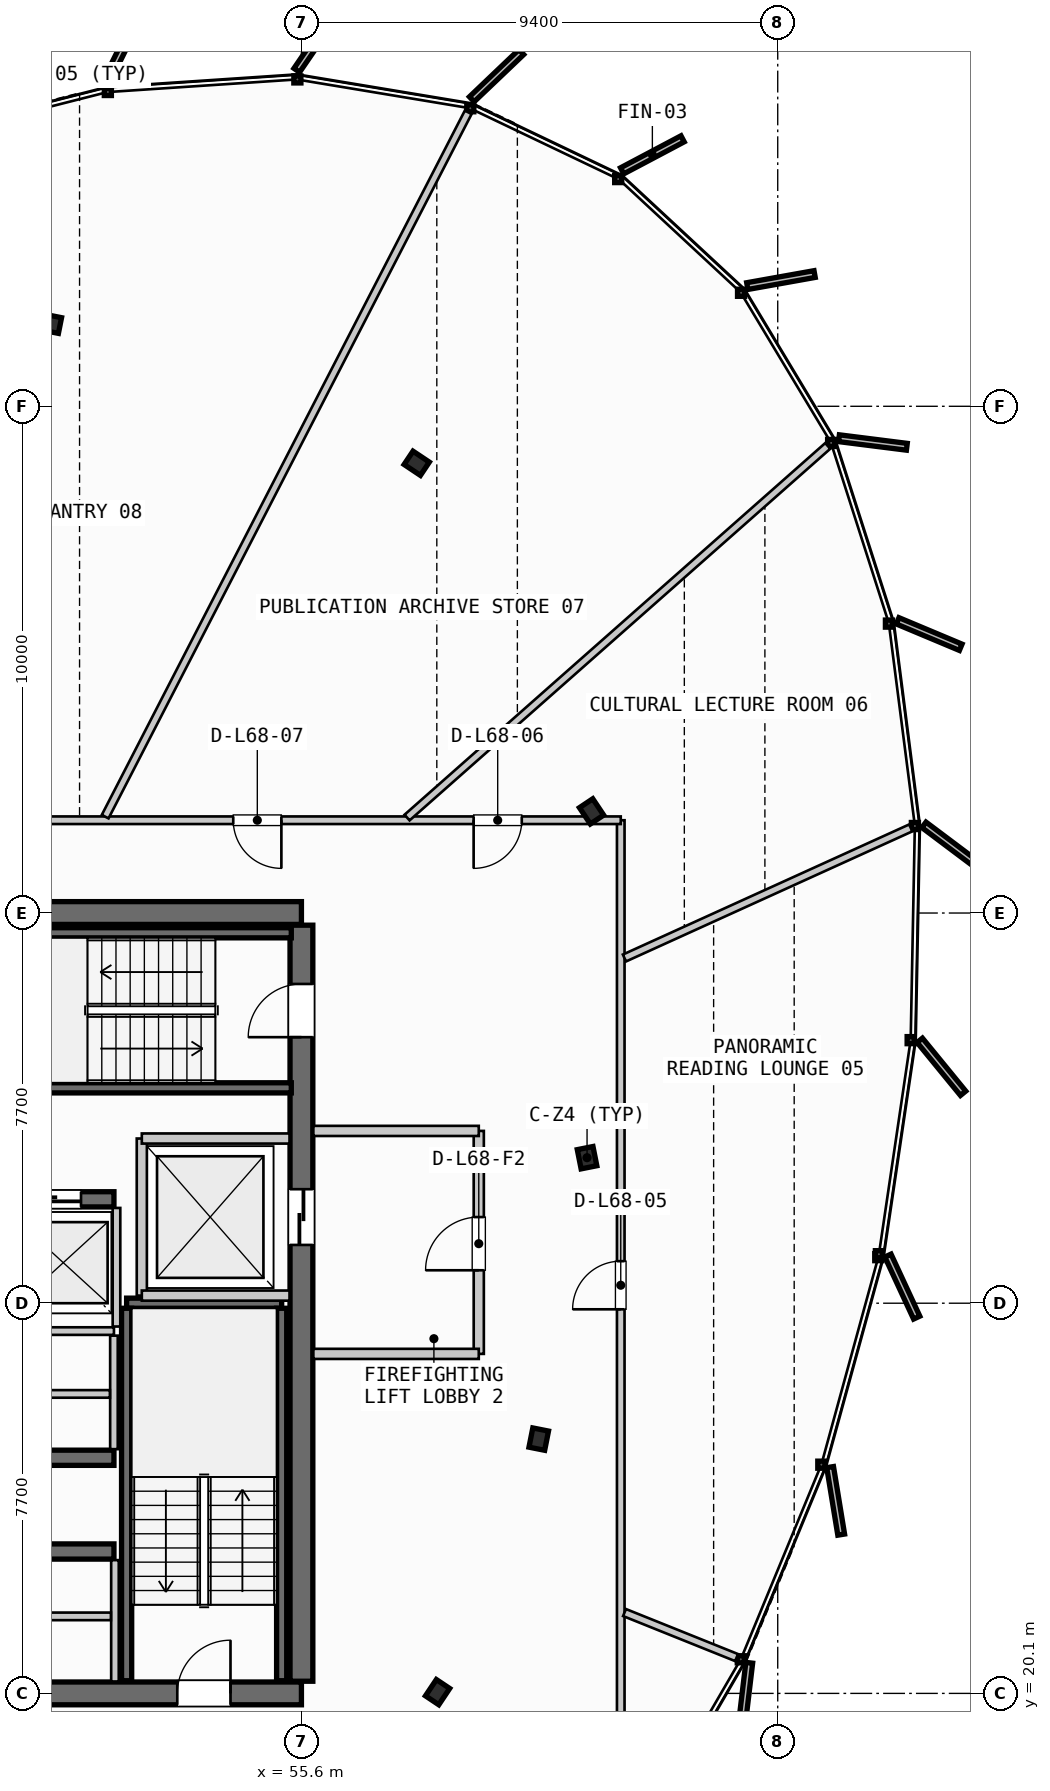
"""IFC4 building model, lengths in metres.
Left out: names, types, materials, properties, quantities, classifications, styles, units other than length and angle.
Written with IfcOpenShell. Run it as: python <this file> out.ifc"""

import sys

from ifc_helpers import new_model, si_unit, direction, frame, frame_2d, origin, origin_2d, place, context, subcontext, project, spatial, rectangle, i_section, extrude, source, transform, mapped, element, fill, save


model = new_model("IFC4")
c1 = context("Model", 3, precision=1e-05, world=origin(), true_north=direction((0.0, 1.0)))
c2 = subcontext(c1, "Body", "Model", "MODEL_VIEW")
j1 = project(units=[si_unit("LENGTHUNIT", "METRE"), si_unit("PLANEANGLEUNIT", "RADIAN")], contexts=[c1])
p1 = place(None, origin())
s1 = spatial("IfcSite", under=j1, at=p1, CompositionType="ELEMENT")
p2 = place(p1, origin())
s2 = spatial("IfcBuilding", under=s1, at=p2, CompositionType="ELEMENT")
p3 = place(p2, frame((0.0, 0.0, 259.45)))
s3 = spatial("IfcBuildingStorey", under=s2, at=p3, CompositionType="ELEMENT", Elevation=259.45)
p4 = place(p3, frame((38.0, 20.1, 0.0), z_axis=(0.0, 0.0, 1.0), x_axis=(1.0, 0.0, 0.0)))
e1 = element("IfcWall", 1, at=p4, inside=s3, PredefinedType="SHEAR", context=c2, shape_type="SweptSolid", body=[
    extrude(rectangle(XDim=17.6, YDim=0.45, at=frame_2d((8.8, 0.0))), origin(), (0.0, 0.0, 1.0), 3.21),
])
p5 = place(p4, frame((1.4, 0.0, 0.0)))
e2 = element("IfcOpeningElement", 2, at=p5, cuts=e1, PredefinedType="OPENING", context=c2, shape_type="SweptSolid", body=[
    extrude(rectangle(XDim=1.05, YDim=2.15, at=frame_2d((0.525, 1.075))), frame((0.0, 0.235, 0.0), z_axis=(0.0, -1.0, 0.0), x_axis=(1.0, 0.0, 0.0)), (0.0, 0.0, 1.0), 0.47),
])
p6 = place(p4, frame((15.15, 0.0, 0.0)))
e3 = element("IfcOpeningElement", 3, at=p6, cuts=e1, PredefinedType="OPENING", context=c2, shape_type="SweptSolid", body=[
    extrude(rectangle(XDim=1.05, YDim=2.15, at=frame_2d((0.525, 1.075))), frame((0.0, 0.235, 0.0), z_axis=(0.0, -1.0, 0.0), x_axis=(1.0, 0.0, 0.0)), (0.0, 0.0, 1.0), 0.47),
])
p7 = place(p4, frame((5.25, 0.0, 0.0)))
e4 = element("IfcOpeningElement", 4, at=p7, cuts=e1, PredefinedType="OPENING", context=c2, shape_type="SweptSolid", body=[
    extrude(rectangle(XDim=0.9, YDim=2.15, at=frame_2d((0.45, 1.075))), frame((0.0, 0.235, 0.0), z_axis=(0.0, -1.0, 0.0), x_axis=(1.0, 0.0, 0.0)), (0.0, 0.0, 1.0), 0.47),
])
p8 = place(p4, frame((11.4, 0.0, 0.0)))
e5 = element("IfcOpeningElement", 5, at=p8, cuts=e1, PredefinedType="OPENING", context=c2, shape_type="SweptSolid", body=[
    extrude(rectangle(XDim=0.95, YDim=2.15, at=frame_2d((0.475, 1.075))), frame((0.0, 0.235, 0.0), z_axis=(0.0, -1.0, 0.0), x_axis=(1.0, 0.0, 0.0)), (0.0, 0.0, 1.0), 0.47),
])
p9 = place(p3, frame((55.6, 35.5, 0.0), z_axis=(0.0, 0.0, 1.0), x_axis=(-1.0, 0.0, 0.0)))
e6 = element("IfcWall", 6, at=p9, inside=s3, PredefinedType="SHEAR", context=c2, shape_type="SweptSolid", body=[
    extrude(rectangle(XDim=17.6, YDim=0.45, at=frame_2d((8.8, 0.0))), origin(), (0.0, 0.0, 1.0), 3.21),
])
p10 = place(p9, frame((8.05, 0.0, 0.0)))
e7 = element("IfcOpeningElement", 7, at=p10, cuts=e6, PredefinedType="OPENING", context=c2, shape_type="SweptSolid", body=[
    extrude(rectangle(XDim=1.5, YDim=2.2, at=frame_2d((0.75, 1.1))), frame((0.0, 0.235, 0.0), z_axis=(0.0, -1.0, 0.0), x_axis=(1.0, 0.0, 0.0)), (0.0, 0.0, 1.0), 0.47),
])
p11 = place(p9, frame((15.1, 0.0, 0.0)))
e8 = element("IfcOpeningElement", 8, at=p11, cuts=e6, PredefinedType="OPENING", context=c2, shape_type="SweptSolid", body=[
    extrude(rectangle(XDim=0.95, YDim=2.15, at=frame_2d((0.475, 1.075))), frame((0.0, 0.235, 0.0), z_axis=(0.0, -1.0, 0.0), x_axis=(1.0, 0.0, 0.0)), (0.0, 0.0, 1.0), 0.47),
])
p12 = place(p9, frame((12.9, 0.0, 0.0)))
e9 = element("IfcOpeningElement", 9, at=p12, cuts=e6, PredefinedType="OPENING", context=c2, shape_type="SweptSolid", body=[
    extrude(rectangle(XDim=0.9, YDim=2.15, at=frame_2d((0.45, 1.075))), frame((0.0, 0.235, 0.0), z_axis=(0.0, -1.0, 0.0), x_axis=(1.0, 0.0, 0.0)), (0.0, 0.0, 1.0), 0.47),
])
p13 = place(p9, frame((10.6, 0.0, 0.0)))
e10 = element("IfcOpeningElement", 10, at=p13, cuts=e6, PredefinedType="OPENING", context=c2, shape_type="SweptSolid", body=[
    extrude(rectangle(XDim=0.95, YDim=2.15, at=frame_2d((0.475, 1.075))), frame((0.0, 0.235, 0.0), z_axis=(0.0, -1.0, 0.0), x_axis=(1.0, 0.0, 0.0)), (0.0, 0.0, 1.0), 0.47),
])
p14 = place(p3, frame((55.6, 20.34, 0.0), z_axis=(0.0, 0.0, 1.0), x_axis=(0.0, 1.0, 0.0)))
e11 = element("IfcWall", 11, at=p14, inside=s3, PredefinedType="SHEAR", context=c2, shape_type="SweptSolid", body=[
    extrude(rectangle(XDim=14.92, YDim=0.45, at=frame_2d((7.46, 0.0))), origin(), (0.0, 0.0, 1.0), 3.21),
])
p15 = place(p14, frame((12.71, 0.0, 0.0)))
e12 = element("IfcOpeningElement", 12, at=p15, cuts=e11, PredefinedType="OPENING", context=c2, shape_type="SweptSolid", body=[
    extrude(rectangle(XDim=1.05, YDim=2.15, at=frame_2d((0.525, 1.075))), frame((0.0, 0.235, 0.0), z_axis=(0.0, -1.0, 0.0), x_axis=(1.0, 0.0, 0.0)), (0.0, 0.0, 1.0), 0.47),
])
p16 = place(p14, frame((8.61, 0.0, 0.0)))
e13 = element("IfcOpeningElement", 13, at=p16, cuts=e11, PredefinedType="OPENING", context=c2, shape_type="SweptSolid", body=[
    extrude(rectangle(XDim=1.1, YDim=2.2, at=frame_2d((0.55, 1.1))), frame((0.0, 0.235, 0.0), z_axis=(0.0, -1.0, 0.0), x_axis=(1.0, 0.0, 0.0)), (0.0, 0.0, 1.0), 0.47),
])
p17 = place(p3, frame((47.65, 22.9, 0.0), z_axis=(0.0, 0.0, 1.0), x_axis=(1.0, 0.0, 0.0)))
e14 = element("IfcWall", 14, at=p17, inside=s3, PredefinedType="SHEAR", context=c2, shape_type="SweptSolid", body=[
    extrude(rectangle(XDim=4.25, YDim=0.3, at=frame_2d((2.125, 0.0))), origin(), (0.0, 0.0, 1.0), 3.21),
])
p18 = place(p3, frame((47.65, 24.75, 0.0), z_axis=(0.0, 0.0, 1.0), x_axis=(1.0, 0.0, 0.0)))
e15 = element("IfcWall", 15, at=p18, inside=s3, PredefinedType="SHEAR", context=c2, shape_type="SweptSolid", body=[
    extrude(rectangle(XDim=4.25, YDim=0.3, at=frame_2d((2.125, 0.0))), origin(), (0.0, 0.0, 1.0), 3.21),
])
p19 = place(p18, frame((1.55, 0.0, 0.0)))
e16 = element("IfcOpeningElement", 16, at=p19, cuts=e15, PredefinedType="OPENING", context=c2, shape_type="SweptSolid", body=[
    extrude(rectangle(XDim=0.95, YDim=2.15, at=frame_2d((0.475, 1.075))), frame((0.0, 0.16, 0.0), z_axis=(0.0, -1.0, 0.0), x_axis=(1.0, 0.0, 0.0)), (0.0, 0.0, 1.0), 0.32),
])
p20 = place(p3, frame((47.65, 29.85, 0.0), z_axis=(0.0, 0.0, 1.0), x_axis=(1.0, 0.0, 0.0)))
e17 = element("IfcWall", 17, at=p20, inside=s3, PredefinedType="SHEAR", context=c2, shape_type="SweptSolid", body=[
    extrude(rectangle(XDim=4.25, YDim=0.3, at=frame_2d((2.125, 0.0))), origin(), (0.0, 0.0, 1.0), 3.21),
])
p21 = place(p20, frame((0.45, 0.0, 0.0)))
e18 = element("IfcOpeningElement", 18, at=p21, cuts=e17, PredefinedType="OPENING", context=c2, shape_type="SweptSolid", body=[
    extrude(rectangle(XDim=1.1, YDim=2.2, at=frame_2d((0.55, 1.1))), frame((0.0, 0.16, 0.0), z_axis=(0.0, -1.0, 0.0), x_axis=(1.0, 0.0, 0.0)), (0.0, 0.0, 1.0), 0.32),
])
p22 = place(p20, frame((2.5, 0.0, 0.0)))
e19 = element("IfcOpeningElement", 19, at=p22, cuts=e17, PredefinedType="OPENING", context=c2, shape_type="SweptSolid", body=[
    extrude(rectangle(XDim=1.1, YDim=2.2, at=frame_2d((0.55, 1.1))), frame((0.0, 0.16, 0.0), z_axis=(0.0, -1.0, 0.0), x_axis=(1.0, 0.0, 0.0)), (0.0, 0.0, 1.0), 0.32),
])
m1 = source(origin(), c2, "Body", "SweptSolid", [
    extrude(i_section(OverallWidth=0.387, OverallDepth=0.316, WebThickness=0.019, FlangeThickness=0.028, FilletRadius=0.015, at=origin_2d()), origin(), (0.0, 0.0, 1.0), 3.21),
])
for number, where, z_axis, x_axis in (
    (20, (61.237, 30.672, 0.0), (0.0, 0.0, 1.0), (0.981, 0.195, 0.0)),
    (21, (61.326, 37.506, 0.0), (0.0, 0.0, 1.0), (0.831, 0.556, 0.0)),
    (22, (57.875, 44.375, 0.0), (0.0, 0.0, 1.0), (0.556, 0.831, 0.0)),
    (23, (50.645, 47.132, 0.0), (0.0, 0.0, 1.0), (0.195, 0.981, 0.0)),
    (24, (58.287, 20.125, 0.0), (0.0, 0.0, 1.0), (0.831, -0.556, 0.0)),
    (25, (60.284, 25.118, 0.0), (0.0, 0.0, 1.0), (0.981, -0.195, 0.0)),
):
    element("IfcColumn", number, at=place(p3, frame(where, z_axis=z_axis, x_axis=x_axis)), inside=s3, PredefinedType="COLUMN", context=c2, shape_type="MappedRepresentation", body=[
        mapped(m1, transform((0.0, 0.0, 0.0), scale=1.0)),
    ])
p23 = place(p3, frame((52.15, 27.8, 0.0), z_axis=(0.0, 0.0, 1.0), x_axis=(1.0, 0.0, 0.0)))
e26 = element("IfcWall", 26, at=p23, inside=s3, PredefinedType="SHEAR", context=c2, shape_type="SweptSolid", body=[
    extrude(rectangle(XDim=3.06, YDim=0.2, at=frame_2d((1.53, 0.0))), origin(), (0.0, 0.0, 1.0), 3.21),
])
for number, where, z_axis, x_axis in (
    (27, (55.21, 27.7, 0.0), (0.0, 0.0, 1.0), (0.0, -1.0, 0.0)),
    (28, (52.15, 20.35, 0.0), (0.0, 0.0, 1.0), (0.0, 1.0, 0.0)),
    (29, (48.05, 35.11, 0.0), (0.0, 0.0, 1.0), (1.0, 0.0, 0.0)),
    (30, (55.4, 32.05, 0.0), (0.0, 0.0, 1.0), (-1.0, 0.0, 0.0)),
):
    element("IfcWall", number, at=place(p3, frame(where, z_axis=z_axis, x_axis=x_axis)), inside=s3, PredefinedType="SHEAR", context=c2, shape_type="SweptSolid", body=[
        extrude(rectangle(XDim=7.35, YDim=0.2, at=frame_2d((3.675, 0.0))), origin(), (0.0, 0.0, 1.0), 3.21),
    ])
p24 = place(p3, frame((52.45, 27.95, 0.0), z_axis=(0.0, 0.0, 1.0), x_axis=(0.0, 1.0, 0.0)))
e31 = element("IfcWall", 31, at=p24, inside=s3, PredefinedType="PARTITIONING", context=c2, shape_type="SweptSolid", body=[
    extrude(rectangle(XDim=3.1, YDim=0.2, at=frame_2d((1.55, 0.0))), origin(), (0.0, 0.0, 1.0), 2.735),
])
for number, where, z_axis, x_axis in (
    (32, (52.45, 27.95, 0.0), (0.0, 0.0, 1.0), (1.0, 0.0, 0.0)),
    (33, (52.45, 31.05, 0.0), (0.0, 0.0, 1.0), (1.0, 0.0, 0.0)),
):
    element("IfcWall", number, at=place(p3, frame(where, z_axis=z_axis, x_axis=x_axis)), inside=s3, PredefinedType="PARTITIONING", context=c2, shape_type="SweptSolid", body=[
        extrude(rectangle(XDim=2.915, YDim=0.2, at=frame_2d((1.458, 0.0))), origin(), (0.0, 0.0, 1.0), 2.735),
    ])
p25 = place(p3, frame((59.1, 26.8, 0.0), z_axis=(0.0, 0.0, 1.0), x_axis=(0.0, 1.0, 0.0)))
e34 = element("IfcWall", 34, at=p25, inside=s3, PredefinedType="PARTITIONING", context=c2, shape_type="SweptSolid", body=[
    extrude(rectangle(XDim=4.4, YDim=0.2, at=frame_2d((2.2, 0.0))), origin(), (0.0, 0.0, 1.0), 2.735),
])
p26 = place(p25, frame((1.65, 0.0, 0.0)))
e35 = element("IfcOpeningElement", 35, at=p26, cuts=e34, PredefinedType="OPENING", context=c2, shape_type="SweptSolid", body=[
    extrude(rectangle(XDim=1.05, YDim=2.15, at=frame_2d((0.525, 1.075))), frame((0.0, 0.11, 0.0), z_axis=(0.0, -1.0, 0.0), x_axis=(1.0, 0.0, 0.0)), (0.0, 0.0, 1.0), 0.22),
])
for number, where, z_axis, x_axis in (
    (36, (55.835, 26.8, 0.0), (0.0, 0.0, 1.0), (1.0, 0.0, 0.0)),
    (37, (55.835, 31.2, 0.0), (0.0, 0.0, 1.0), (1.0, 0.0, 0.0)),
):
    element("IfcWall", number, at=place(p3, frame(where, z_axis=z_axis, x_axis=x_axis)), inside=s3, PredefinedType="PARTITIONING", context=c2, shape_type="SweptSolid", body=[
        extrude(rectangle(XDim=3.265, YDim=0.2, at=frame_2d((1.633, 0.0))), origin(), (0.0, 0.0, 1.0), 2.735),
    ])
p27 = place(p3, frame((51.92, 20.335, 0.0), z_axis=(0.0, 0.0, 1.0), x_axis=(0.0, 1.0, 0.0)))
e38 = element("IfcWall", 38, at=p27, inside=s3, PredefinedType="PARTITIONING", context=c2, shape_type="SweptSolid", body=[
    extrude(rectangle(XDim=2.395, YDim=0.15, at=frame_2d((1.198, 0.0))), origin(), (0.0, 0.0, 1.0), 2.735),
])
p28 = place(p3, frame((47.88, 21.62, 0.0), z_axis=(0.0, 0.0, 1.0), x_axis=(1.0, 0.0, 0.0)))
e39 = element("IfcWall", 39, at=p28, inside=s3, PredefinedType="PARTITIONING", context=c2, shape_type="SweptSolid", body=[
    extrude(rectangle(XDim=3.96, YDim=0.15, at=frame_2d((1.98, 0.0))), origin(), (0.0, 0.0, 1.0), 2.735),
])
p29 = place(p28, frame((1.55, 0.0, 0.0)))
e40 = element("IfcOpeningElement", 40, at=p29, cuts=e39, PredefinedType="OPENING", context=c2, shape_type="SweptSolid", body=[
    extrude(rectangle(XDim=0.85, YDim=2.15, at=frame_2d((0.425, 1.075))), frame((0.0, 0.085, 0.0), z_axis=(0.0, -1.0, 0.0), x_axis=(1.0, 0.0, 0.0)), (0.0, 0.0, 1.0), 0.17),
])
p30 = place(p3, frame((47.65, 27.25, 0.0), z_axis=(0.0, 0.0, 1.0), x_axis=(1.0, 0.0, 0.0)))
e41 = element("IfcWall", 41, at=p30, inside=s3, PredefinedType="PARTITIONING", context=c2, shape_type="SweptSolid", body=[
    extrude(rectangle(XDim=4.25, YDim=0.15, at=frame_2d((2.125, 0.0))), origin(), (0.0, 0.0, 1.0), 2.735),
])
p31 = place(p3, frame((51.9, 24.92, 0.0), z_axis=(0.0, 0.0, 1.0), x_axis=(0.0, 1.0, 0.0)))
e42 = element("IfcWall", 42, at=p31, inside=s3, PredefinedType="PARTITIONING", context=c2, shape_type="SweptSolid", body=[
    extrude(rectangle(XDim=2.24, YDim=0.15, at=frame_2d((1.12, 0.0))), origin(), (0.0, 0.0, 1.0), 2.735),
])
p32 = place(p3, frame((47.73, 26.01, 0.0), z_axis=(0.0, 0.0, 1.0), x_axis=(1.0, 0.0, 0.0)))
e43 = element("IfcWall", 43, at=p32, inside=s3, PredefinedType="PARTITIONING", context=c2, shape_type="SweptSolid", body=[
    extrude(rectangle(XDim=4.09, YDim=0.15, at=frame_2d((2.045, 0.0))), origin(), (0.0, 0.0, 1.0), 2.735),
])
p33 = place(p32, frame((1.6, 0.0, 0.0)))
e44 = element("IfcOpeningElement", 44, at=p33, cuts=e43, PredefinedType="OPENING", context=c2, shape_type="SweptSolid", body=[
    extrude(rectangle(XDim=0.85, YDim=2.15, at=frame_2d((0.425, 1.075))), frame((0.0, 0.085, 0.0), z_axis=(0.0, -1.0, 0.0), x_axis=(1.0, 0.0, 0.0)), (0.0, 0.0, 1.0), 0.17),
])
p34 = place(p3, frame((51.95, 27.34, 0.0), z_axis=(0.0, 0.0, 1.0), x_axis=(0.0, 1.0, 0.0)))
e45 = element("IfcWall", 45, at=p34, inside=s3, PredefinedType="PARTITIONING", context=c2, shape_type="SweptSolid", body=[
    extrude(rectangle(XDim=2.34, YDim=0.15, at=frame_2d((1.17, 0.0))), origin(), (0.0, 0.0, 1.0), 2.735),
])
p35 = place(p3, frame((61.902, 17.807, 0.0), z_axis=(0.0, 0.0, 1.0), x_axis=(0.0, 1.0, 0.0)))
e46 = element("IfcWall", 46, at=p35, inside=s3, PredefinedType="PARTITIONING", context=c2, shape_type="SweptSolid", body=[
    extrude(rectangle(XDim=19.524, YDim=0.15, at=frame_2d((9.762, 0.0))), origin(), (0.0, 0.0, 1.0), 2.735),
])
p36 = place(p35, frame((9.873, 0.0, 0.0)))
e47 = element("IfcOpeningElement", 47, at=p36, cuts=e46, PredefinedType="OPENING", context=c2, shape_type="SweptSolid", body=[
    extrude(rectangle(XDim=0.95, YDim=2.15, at=frame_2d((0.475, 1.075))), frame((0.0, 0.085, 0.0), z_axis=(0.0, -1.0, 0.0), x_axis=(1.0, 0.0, 0.0)), (0.0, 0.0, 1.0), 0.17),
])
p37 = place(p3, frame((61.902, 37.331, 0.0), z_axis=(0.0, 0.0, 1.0), x_axis=(-1.0, 0.0, 0.0)))
e48 = element("IfcWall", 48, at=p37, inside=s3, PredefinedType="PARTITIONING", context=c2, shape_type="SweptSolid", body=[
    extrude(rectangle(XDim=29.442, YDim=0.15, at=frame_2d((14.721, 0.0))), origin(), (0.0, 0.0, 1.0), 2.735),
])
p38 = place(p37, frame((1.954, 0.0, 0.0)))
e49 = element("IfcOpeningElement", 49, at=p38, cuts=e48, PredefinedType="OPENING", context=c2, shape_type="SweptSolid", body=[
    extrude(rectangle(XDim=0.95, YDim=2.15, at=frame_2d((0.475, 1.075))), frame((0.0, 0.085, 0.0), z_axis=(0.0, -1.0, 0.0), x_axis=(1.0, 0.0, 0.0)), (0.0, 0.0, 1.0), 0.17),
])
p39 = place(p37, frame((6.698, 0.0, 0.0)))
e50 = element("IfcOpeningElement", 50, at=p39, cuts=e48, PredefinedType="OPENING", context=c2, shape_type="SweptSolid", body=[
    extrude(rectangle(XDim=0.95, YDim=2.15, at=frame_2d((0.475, 1.075))), frame((0.0, 0.085, 0.0), z_axis=(0.0, -1.0, 0.0), x_axis=(1.0, 0.0, 0.0)), (0.0, 0.0, 1.0), 0.17),
])
p40 = place(p37, frame((12.808, 0.0, 0.0)))
e51 = element("IfcOpeningElement", 51, at=p40, cuts=e48, PredefinedType="OPENING", context=c2, shape_type="SweptSolid", body=[
    extrude(rectangle(XDim=0.95, YDim=2.15, at=frame_2d((0.475, 1.075))), frame((0.0, 0.085, 0.0), z_axis=(0.0, -1.0, 0.0), x_axis=(1.0, 0.0, 0.0)), (0.0, 0.0, 1.0), 0.17),
])
p41 = place(p37, frame((22.149, 0.0, 0.0)))
e52 = element("IfcOpeningElement", 52, at=p41, cuts=e48, PredefinedType="OPENING", context=c2, shape_type="SweptSolid", body=[
    extrude(rectangle(XDim=0.95, YDim=2.15, at=frame_2d((0.475, 1.075))), frame((0.0, 0.085, 0.0), z_axis=(0.0, -1.0, 0.0), x_axis=(1.0, 0.0, 0.0)), (0.0, 0.0, 1.0), 0.17),
])
p42 = place(p3, frame((61.976, 21.695, 0.0), z_axis=(0.0, 0.0, 1.0), x_axis=(0.927896312923, -0.37283834629, 0.0)))
e53 = element("IfcWall", 53, at=p42, inside=s3, PredefinedType="PARTITIONING", context=c2, shape_type="SweptSolid", body=[
    extrude(rectangle(XDim=2.384, YDim=0.15, at=frame_2d((1.192, 0.0))), origin(), (0.0, 0.0, 1.0), 2.735),
])
p43 = place(p3, frame((61.975, 34.612, 0.0), z_axis=(0.0, 0.0, 1.0), x_axis=(0.910425743719, 0.413672533743, 0.0)))
e54 = element("IfcWall", 54, at=p43, inside=s3, PredefinedType="PARTITIONING", context=c2, shape_type="SweptSolid", body=[
    extrude(rectangle(XDim=6.206, YDim=0.15, at=frame_2d((3.103, 0.0))), origin(), (0.0, 0.0, 1.0), 2.735),
])
p44 = place(p3, frame((57.685, 37.384, 0.0), z_axis=(0.0, 0.0, 1.0), x_axis=(0.749480137602, 0.662026829774, 0.0)))
e55 = element("IfcWall", 55, at=p44, inside=s3, PredefinedType="PARTITIONING", context=c2, shape_type="SweptSolid", body=[
    extrude(rectangle(XDim=11.077, YDim=0.15, at=frame_2d((5.539, 0.0))), origin(), (0.0, 0.0, 1.0), 2.735),
])
p45 = place(p3, frame((51.727, 37.402, 0.0), z_axis=(0.0, 0.0, 1.0), x_axis=(0.458208193746, 0.888844897147, 0.0)))
e56 = element("IfcWall", 56, at=p45, inside=s3, PredefinedType="PARTITIONING", context=c2, shape_type="SweptSolid", body=[
    extrude(rectangle(XDim=15.638, YDim=0.15, at=frame_2d((7.819, 0.0))), origin(), (0.0, 0.0, 1.0), 2.735),
])
m2 = source(origin(), c2, "Body", "SweptSolid", [
    extrude(rectangle(XDim=1.05, YDim=2.15, at=frame_2d((0.525, 1.075))), frame((0.0, 0.025, 0.0), z_axis=(0.0, -1.0, 0.0), x_axis=(1.0, 0.0, 0.0)), (0.0, 0.0, 1.0), 0.05),
])
p46 = place(p6, origin())
e57 = element("IfcDoor", 57, at=p46, inside=s3, OperationType="SINGLE_SWING_RIGHT", PredefinedType="DOOR", context=c2, shape_type="MappedRepresentation", body=[
    mapped(m2, transform((0.0, 0.0, 0.0), scale=1.0)),
])
fill(e3, e57)
p47 = place(p15, origin())
e58 = element("IfcDoor", 58, at=p47, inside=s3, OperationType="SINGLE_SWING_LEFT", PredefinedType="DOOR", context=c2, shape_type="MappedRepresentation", body=[
    mapped(m2, transform((0.0, 0.0, 0.0), scale=1.0)),
])
fill(e12, e58)
m3 = source(origin(), c2, "Body", "SweptSolid", [
    extrude(rectangle(XDim=1.1, YDim=2.2, at=frame_2d((0.55, 1.1))), frame((0.0, 0.025, 0.0), z_axis=(0.0, -1.0, 0.0), x_axis=(1.0, 0.0, 0.0)), (0.0, 0.0, 1.0), 0.05),
])
p48 = place(p16, origin())
e59 = element("IfcDoor", 59, at=p48, inside=s3, OperationType="SLIDING_TO_RIGHT", PredefinedType="DOOR", context=c2, shape_type="MappedRepresentation", body=[
    mapped(m3, transform((0.0, 0.0, 0.0), scale=1.0)),
])
fill(e13, e59)
p49 = place(p22, origin())
e60 = element("IfcDoor", 60, at=p49, inside=s3, OperationType="SLIDING_TO_LEFT", PredefinedType="DOOR", context=c2, shape_type="MappedRepresentation", body=[
    mapped(m3, transform((0.0, 0.0, 0.0), scale=1.0)),
])
fill(e19, e60)
p50 = place(p26, origin())
e61 = element("IfcDoor", 61, at=p50, inside=s3, OperationType="SINGLE_SWING_LEFT", PredefinedType="DOOR", context=c2, shape_type="MappedRepresentation", body=[
    mapped(m2, transform((0.0, 0.0, 0.0), scale=1.0)),
])
fill(e35, e61)
m4 = source(origin(), c2, "Body", "SweptSolid", [
    extrude(rectangle(XDim=0.95, YDim=2.15, at=frame_2d((0.475, 1.075))), frame((0.0, 0.025, 0.0), z_axis=(0.0, -1.0, 0.0), x_axis=(1.0, 0.0, 0.0)), (0.0, 0.0, 1.0), 0.05),
])
p51 = place(p36, origin())
e62 = element("IfcDoor", 62, at=p51, inside=s3, OperationType="SINGLE_SWING_LEFT", PredefinedType="DOOR", context=c2, shape_type="MappedRepresentation", body=[
    mapped(m4, transform((0.0, 0.0, 0.0), scale=1.0)),
])
fill(e47, e62)
p52 = place(p38, origin())
e63 = element("IfcDoor", 63, at=p52, inside=s3, OperationType="SINGLE_SWING_RIGHT", PredefinedType="DOOR", context=c2, shape_type="MappedRepresentation", body=[
    mapped(m4, transform((0.0, 0.0, 0.0), scale=1.0)),
])
fill(e49, e63)
p53 = place(p39, origin())
e64 = element("IfcDoor", 64, at=p53, inside=s3, OperationType="SINGLE_SWING_LEFT", PredefinedType="DOOR", context=c2, shape_type="MappedRepresentation", body=[
    mapped(m4, transform((0.0, 0.0, 0.0), scale=1.0)),
])
fill(e50, e64)
save(model, sys.argv[1])
